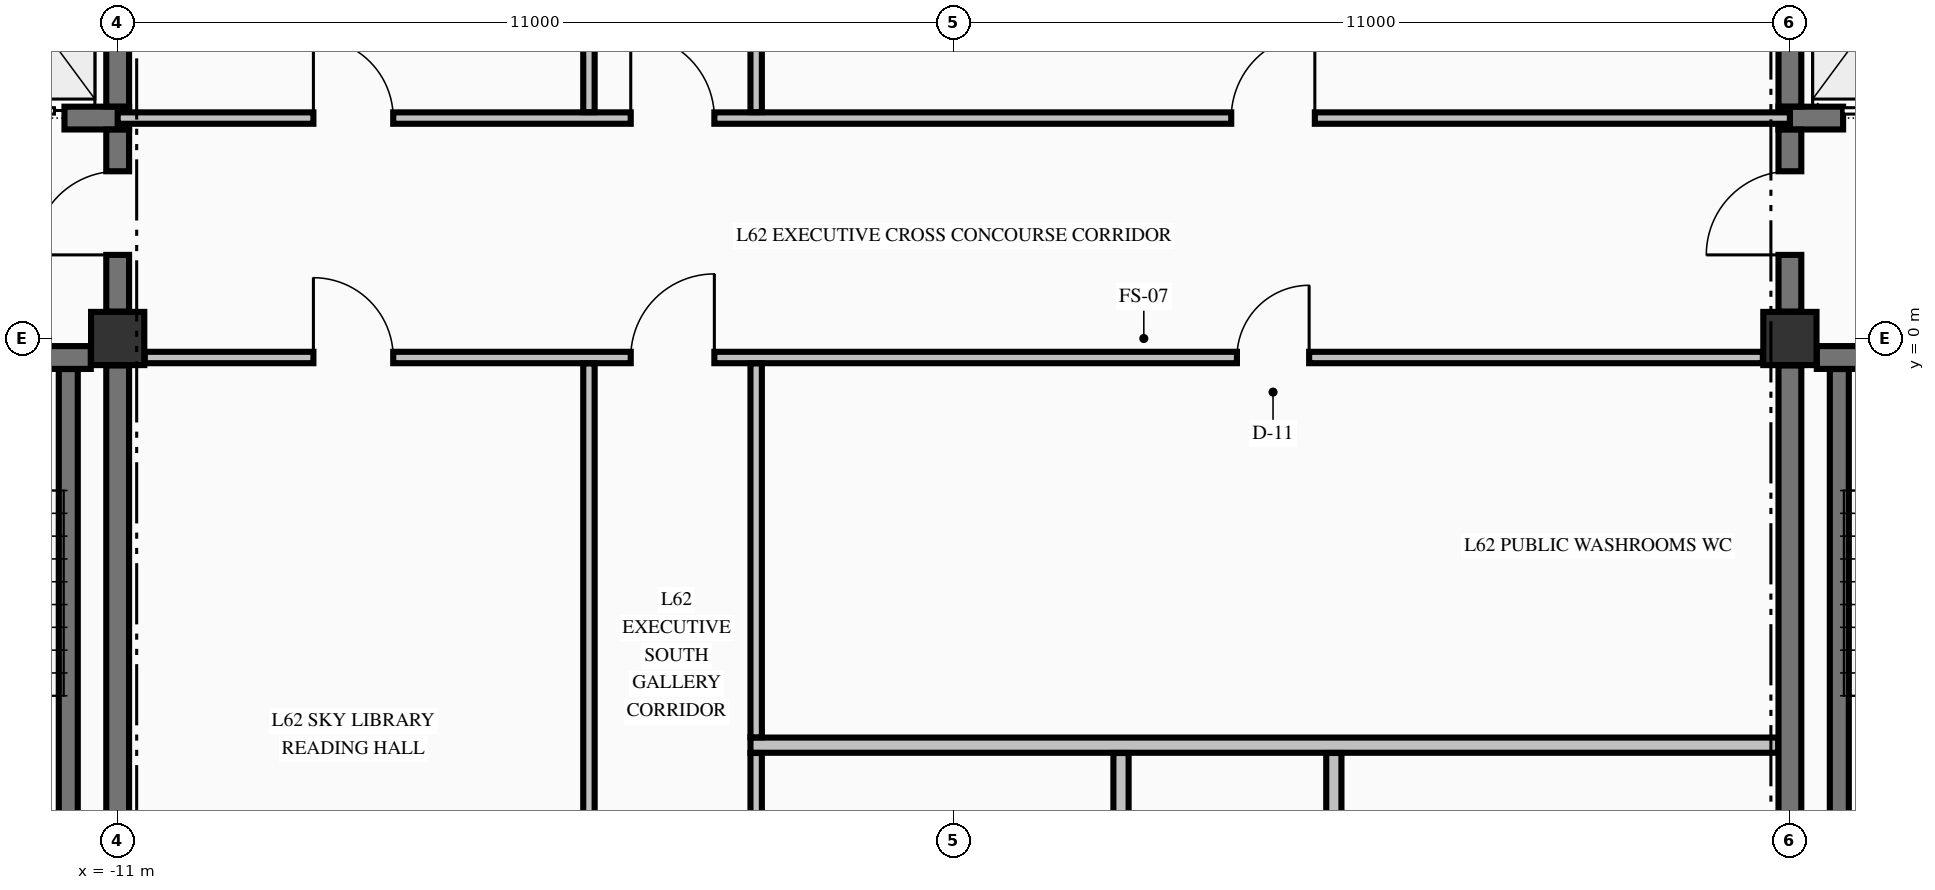
"""IFC4 building model, lengths in metres.
Left out: names, types, materials, properties, quantities, classifications, styles, units other than length and angle.
Written with IfcOpenShell. Run it as: python <this file> out.ifc"""

import sys

from ifc_helpers import new_model, si_unit, direction, frame, frame_2d, origin, origin_2d, place, context, subcontext, project, spatial, rectangle, extrude, element, fill, save


model = new_model("IFC4")
c1 = context("Model", 3, precision=1e-05, world=origin(), true_north=direction((0.0, 1.0)))
c2 = subcontext(c1, "Body", "Model", "MODEL_VIEW")
j1 = project(units=[si_unit("LENGTHUNIT", "METRE"), si_unit("PLANEANGLEUNIT", "RADIAN")], contexts=[c1])
p1 = place(None, origin())
s1 = spatial("IfcSite", under=j1, at=p1, CompositionType="ELEMENT")
p2 = place(p1, origin())
s2 = spatial("IfcBuilding", under=s1, at=p2, CompositionType="ELEMENT")
p3 = place(p2, frame((0.0, 0.0, 236.51)))
s3 = spatial("IfcBuildingStorey", under=s2, at=p3, CompositionType="ELEMENT", Elevation=236.51)
for number, where, z_axis, x_axis in (
    (1, (-11.0, 0.0, -0.25), (0.0, 0.0, 1.0), (1.0, 0.0, 0.0)),
    (2, (11.0, 0.0, -0.25), (0.0, 0.0, 1.0), (1.0, 0.0, 0.0)),
):
    element("IfcColumn", number, at=place(p3, frame(where, z_axis=z_axis, x_axis=x_axis)), inside=s3, PredefinedType="COLUMN", context=c2, shape_type="SweptSolid", body=[
        extrude(rectangle(XDim=0.7, YDim=0.7, at=origin_2d()), origin(), (0.0, 0.0, 1.0), 3.23),
    ])
p4 = place(p3, frame((-20.571, -0.25, 0.0), z_axis=(0.0, 0.0, 1.0), x_axis=(1.0, 0.0, 0.0)))
e3 = element("IfcWall", 3, at=p4, inside=s3, PredefinedType="SHEAR", context=c2, shape_type="SweptSolid", body=[
    extrude(rectangle(XDim=9.217, YDim=0.3, at=frame_2d((4.608, 0.0))), origin(), (0.0, 0.0, 1.0), 2.98),
])
p5 = place(p4, frame((6.871, 0.0, 0.0)))
e4 = element("IfcOpeningElement", 4, at=p5, cuts=e3, PredefinedType="OPENING", context=c2, shape_type="SweptSolid", body=[
    extrude(rectangle(XDim=1.1, YDim=2.15, at=frame_2d((0.55, 1.075))), frame((0.0, 0.16, 0.0), z_axis=(0.0, -1.0, 0.0), x_axis=(1.0, 0.0, 0.0)), (0.0, 0.0, 1.0), 0.32),
])
p6 = place(p3, frame((11.354, -0.25, 0.0), z_axis=(0.0, 0.0, 1.0), x_axis=(1.0, 0.0, 0.0)))
e5 = element("IfcWall", 5, at=p6, inside=s3, PredefinedType="SHEAR", context=c2, shape_type="SweptSolid", body=[
    extrude(rectangle(XDim=3.521, YDim=0.3, at=frame_2d((1.76, 0.0))), origin(), (0.0, 0.0, 1.0), 2.98),
])
p7 = place(p6, frame((1.246, 0.0, 0.0)))
e6 = element("IfcOpeningElement", 6, at=p7, cuts=e5, PredefinedType="OPENING", context=c2, shape_type="SweptSolid", body=[
    extrude(rectangle(XDim=1.1, YDim=2.15, at=frame_2d((0.55, 1.075))), frame((0.0, 0.16, 0.0), z_axis=(0.0, -1.0, 0.0), x_axis=(1.0, 0.0, 0.0)), (0.0, 0.0, 1.0), 0.32),
])
p8 = place(p3, frame((-14.875, 2.9, 0.0), z_axis=(0.0, 0.0, 1.0), x_axis=(1.0, 0.0, 0.0)))
e7 = element("IfcWall", 7, at=p8, inside=s3, PredefinedType="SHEAR", context=c2, shape_type="SweptSolid", body=[
    extrude(rectangle(XDim=4.025, YDim=0.3, at=frame_2d((2.012, 0.0))), origin(), (0.0, 0.0, 1.0), 2.98),
])
p9 = place(p8, frame((2.075, 0.0, 0.0)))
e8 = element("IfcOpeningElement", 8, at=p9, cuts=e7, PredefinedType="OPENING", context=c2, shape_type="SweptSolid", body=[
    extrude(rectangle(XDim=1.1, YDim=2.2, at=frame_2d((0.55, 1.1))), frame((0.0, 0.16, 0.0), z_axis=(0.0, -1.0, 0.0), x_axis=(1.0, 0.0, 0.0)), (0.0, 0.0, 1.0), 0.32),
])
p10 = place(p3, frame((10.85, 2.9, 0.0), z_axis=(0.0, 0.0, 1.0), x_axis=(1.0, 0.0, 0.0)))
e9 = element("IfcWall", 9, at=p10, inside=s3, PredefinedType="SHEAR", context=c2, shape_type="SweptSolid", body=[
    extrude(rectangle(XDim=4.025, YDim=0.3, at=frame_2d((2.012, 0.0))), origin(), (0.0, 0.0, 1.0), 2.98),
])
p11 = place(p10, frame((0.85, 0.0, 0.0)))
e10 = element("IfcOpeningElement", 10, at=p11, cuts=e9, PredefinedType="OPENING", context=c2, shape_type="SweptSolid", body=[
    extrude(rectangle(XDim=1.1, YDim=2.2, at=frame_2d((0.55, 1.1))), frame((0.0, 0.16, 0.0), z_axis=(0.0, -1.0, 0.0), x_axis=(1.0, 0.0, 0.0)), (0.0, 0.0, 1.0), 0.32),
])
p12 = place(p3, frame((-2.675, -5.35, 0.0), z_axis=(0.0, 0.0, 1.0), x_axis=(1.0, 0.0, 0.0)))
e11 = element("IfcWall", 11, at=p12, inside=s3, PredefinedType="PARTITIONING", context=c2, shape_type="SweptSolid", body=[
    extrude(rectangle(XDim=13.522, YDim=0.2, at=frame_2d((6.761, 0.0))), origin(), (0.0, 0.0, 1.0), 2.98),
])
p13 = place(p3, frame((-10.644, -0.25, 0.0), z_axis=(0.0, 0.0, 1.0), x_axis=(1.0, 0.0, 0.0)))
e12 = element("IfcWall", 12, at=p13, inside=s3, PredefinedType="PARTITIONING", context=c2, shape_type="SweptSolid", body=[
    extrude(rectangle(XDim=21.288, YDim=0.15, at=frame_2d((10.644, 0.0))), origin(), (0.0, 0.0, 1.0), 2.98),
])
p14 = place(p13, frame((6.394, 0.0, 0.0)))
e13 = element("IfcOpeningElement", 13, at=p14, cuts=e12, PredefinedType="OPENING", context=c2, shape_type="SweptSolid", body=[
    extrude(rectangle(XDim=1.1, YDim=2.15, at=frame_2d((0.55, 1.075))), frame((0.0, 0.085, 0.0), z_axis=(0.0, -1.0, 0.0), x_axis=(1.0, 0.0, 0.0)), (0.0, 0.0, 1.0), 0.17),
])
p15 = place(p13, frame((2.219, 0.0, 0.0)))
e14 = element("IfcOpeningElement", 14, at=p15, cuts=e12, PredefinedType="OPENING", context=c2, shape_type="SweptSolid", body=[
    extrude(rectangle(XDim=1.05, YDim=2.15, at=frame_2d((0.525, 1.075))), frame((0.0, 0.085, 0.0), z_axis=(0.0, -1.0, 0.0), x_axis=(1.0, 0.0, 0.0)), (0.0, 0.0, 1.0), 0.17),
])
p16 = place(p13, frame((14.369, 0.0, 0.0)))
e15 = element("IfcOpeningElement", 15, at=p16, cuts=e12, PredefinedType="OPENING", context=c2, shape_type="SweptSolid", body=[
    extrude(rectangle(XDim=0.95, YDim=2.15, at=frame_2d((0.475, 1.075))), frame((0.0, 0.085, 0.0), z_axis=(0.0, -1.0, 0.0), x_axis=(1.0, 0.0, 0.0)), (0.0, 0.0, 1.0), 0.17),
])
p17 = place(p3, frame((-11.0, 2.9, 0.0), z_axis=(0.0, 0.0, 1.0), x_axis=(1.0, 0.0, 0.0)))
e16 = element("IfcWall", 16, at=p17, inside=s3, PredefinedType="PARTITIONING", context=c2, shape_type="SweptSolid", body=[
    extrude(rectangle(XDim=22.0, YDim=0.15, at=frame_2d((11.0, 0.0))), origin(), (0.0, 0.0, 1.0), 2.98),
])
p18 = place(p17, frame((6.75, 0.0, 0.0)))
e17 = element("IfcOpeningElement", 17, at=p18, cuts=e16, PredefinedType="OPENING", context=c2, shape_type="SweptSolid", body=[
    extrude(rectangle(XDim=1.1, YDim=2.15, at=frame_2d((0.55, 1.075))), frame((0.0, 0.085, 0.0), z_axis=(0.0, -1.0, 0.0), x_axis=(1.0, 0.0, 0.0)), (0.0, 0.0, 1.0), 0.17),
])
p19 = place(p17, frame((2.575, 0.0, 0.0)))
e18 = element("IfcOpeningElement", 18, at=p19, cuts=e16, PredefinedType="OPENING", context=c2, shape_type="SweptSolid", body=[
    extrude(rectangle(XDim=1.05, YDim=2.15, at=frame_2d((0.525, 1.075))), frame((0.0, 0.085, 0.0), z_axis=(0.0, -1.0, 0.0), x_axis=(1.0, 0.0, 0.0)), (0.0, 0.0, 1.0), 0.17),
])
p20 = place(p17, frame((14.65, 0.0, 0.0)))
e19 = element("IfcOpeningElement", 19, at=p20, cuts=e16, PredefinedType="OPENING", context=c2, shape_type="SweptSolid", body=[
    extrude(rectangle(XDim=1.1, YDim=2.15, at=frame_2d((0.55, 1.075))), frame((0.0, 0.085, 0.0), z_axis=(0.0, -1.0, 0.0), x_axis=(1.0, 0.0, 0.0)), (0.0, 0.0, 1.0), 0.17),
])
p21 = place(p3, frame((-11.65, -9.798, 0.0), z_axis=(0.0, 0.0, 1.0), x_axis=(0.0, 1.0, 0.0)))
e20 = element("IfcWall", 20, at=p21, inside=s3, PredefinedType="SOLIDWALL", context=c2, shape_type="SweptSolid", body=[
    extrude(rectangle(XDim=9.396, YDim=0.25, at=frame_2d((4.698, 0.0))), origin(), (0.0, 0.0, 1.0), 2.98),
])
p22 = place(p3, frame((-11.0, -9.596, 0.0), z_axis=(0.0, 0.0, 1.0), x_axis=(0.0, 1.0, 0.0)))
e21 = element("IfcWall", 21, at=p22, inside=s3, PredefinedType="SHEAR", context=c2, shape_type="SweptSolid", body=[
    extrude(rectangle(XDim=9.242, YDim=0.3, at=frame_2d((4.621, 0.0))), origin(), (0.0, 0.0, 1.0), 2.98),
])
p23 = place(p3, frame((-11.0, 0.354, 0.0), z_axis=(0.0, 0.0, 1.0), x_axis=(0.0, 1.0, 0.0)))
e22 = element("IfcWall", 22, at=p23, inside=s3, PredefinedType="SHEAR", context=c2, shape_type="SweptSolid", body=[
    extrude(rectangle(XDim=2.394, YDim=0.3, at=frame_2d((1.197, 0.0))), origin(), (0.0, 0.0, 1.0), 2.98),
])
p24 = place(p23, frame((0.746, 0.0, 0.0)))
e23 = element("IfcOpeningElement", 23, at=p24, cuts=e22, PredefinedType="OPENING", context=c2, shape_type="SweptSolid", body=[
    extrude(rectangle(XDim=1.1, YDim=2.15, at=frame_2d((0.55, 1.075))), frame((0.0, 0.16, 0.0), z_axis=(0.0, -1.0, 0.0), x_axis=(1.0, 0.0, 0.0)), (0.0, 0.0, 1.0), 0.32),
])
p25 = place(p3, frame((-11.0, 3.052, 0.0), z_axis=(0.0, 0.0, 1.0), x_axis=(0.0, 1.0, 0.0)))
e24 = element("IfcWall", 24, at=p25, inside=s3, PredefinedType="SHEAR", context=c2, shape_type="SweptSolid", body=[
    extrude(rectangle(XDim=2.496, YDim=0.3, at=frame_2d((1.248, 0.0))), origin(), (0.0, 0.0, 1.0), 2.98),
])
p26 = place(p3, frame((11.0, -9.596, 0.0), z_axis=(0.0, 0.0, 1.0), x_axis=(0.0, 1.0, 0.0)))
e25 = element("IfcWall", 25, at=p26, inside=s3, PredefinedType="SHEAR", context=c2, shape_type="SweptSolid", body=[
    extrude(rectangle(XDim=9.242, YDim=0.3, at=frame_2d((4.621, 0.0))), origin(), (0.0, 0.0, 1.0), 2.98),
])
p27 = place(p3, frame((11.0, 0.354, 0.0), z_axis=(0.0, 0.0, 1.0), x_axis=(0.0, 1.0, 0.0)))
e26 = element("IfcWall", 26, at=p27, inside=s3, PredefinedType="SHEAR", context=c2, shape_type="SweptSolid", body=[
    extrude(rectangle(XDim=2.394, YDim=0.3, at=frame_2d((1.197, 0.0))), origin(), (0.0, 0.0, 1.0), 2.98),
])
p28 = place(p27, frame((0.746, 0.0, 0.0)))
e27 = element("IfcOpeningElement", 27, at=p28, cuts=e26, PredefinedType="OPENING", context=c2, shape_type="SweptSolid", body=[
    extrude(rectangle(XDim=1.1, YDim=2.15, at=frame_2d((0.55, 1.075))), frame((0.0, 0.16, 0.0), z_axis=(0.0, -1.0, 0.0), x_axis=(1.0, 0.0, 0.0)), (0.0, 0.0, 1.0), 0.32),
])
p29 = place(p3, frame((11.0, 3.052, 0.0), z_axis=(0.0, 0.0, 1.0), x_axis=(0.0, 1.0, 0.0)))
e28 = element("IfcWall", 28, at=p29, inside=s3, PredefinedType="SHEAR", context=c2, shape_type="SweptSolid", body=[
    extrude(rectangle(XDim=2.496, YDim=0.3, at=frame_2d((1.248, 0.0))), origin(), (0.0, 0.0, 1.0), 2.98),
])
p30 = place(p3, frame((11.65, -9.798, 0.0), z_axis=(0.0, 0.0, 1.0), x_axis=(0.0, 1.0, 0.0)))
e29 = element("IfcWall", 29, at=p30, inside=s3, PredefinedType="SOLIDWALL", context=c2, shape_type="SweptSolid", body=[
    extrude(rectangle(XDim=9.396, YDim=0.25, at=frame_2d((4.698, 0.0))), origin(), (0.0, 0.0, 1.0), 2.98),
])
p31 = place(p3, frame((-4.8, -9.872, 0.0), z_axis=(0.0, 0.0, 1.0), x_axis=(0.0, 1.0, 0.0)))
e30 = element("IfcWall", 30, at=p31, inside=s3, PredefinedType="PARTITIONING", context=c2, shape_type="SweptSolid", body=[
    extrude(rectangle(XDim=9.544, YDim=0.15, at=frame_2d((4.772, 0.0))), origin(), (0.0, 0.0, 1.0), 2.98),
])
p32 = place(p3, frame((-4.8, 2.978, 0.0), z_axis=(0.0, 0.0, 1.0), x_axis=(0.0, 1.0, 0.0)))
e31 = element("IfcWall", 31, at=p32, inside=s3, PredefinedType="PARTITIONING", context=c2, shape_type="SweptSolid", body=[
    extrude(rectangle(XDim=7.444, YDim=0.15, at=frame_2d((3.722, 0.0))), origin(), (0.0, 0.0, 1.0), 2.98),
])
p33 = place(p3, frame((-2.6, -9.872, 0.0), z_axis=(0.0, 0.0, 1.0), x_axis=(0.0, 1.0, 0.0)))
e32 = element("IfcWall", 32, at=p33, inside=s3, PredefinedType="PARTITIONING", context=c2, shape_type="SweptSolid", body=[
    extrude(rectangle(XDim=4.419, YDim=0.15, at=frame_2d((2.209, 0.0))), origin(), (0.0, 0.0, 1.0), 2.98),
])
p34 = place(p33, frame((2.597, 0.0, 0.0)))
e33 = element("IfcOpeningElement", 33, at=p34, cuts=e32, PredefinedType="OPENING", context=c2, shape_type="SweptSolid", body=[
    extrude(rectangle(XDim=0.95, YDim=2.15, at=frame_2d((0.475, 1.075))), frame((0.0, 0.085, 0.0), z_axis=(0.0, -1.0, 0.0), x_axis=(1.0, 0.0, 0.0)), (0.0, 0.0, 1.0), 0.17),
])
p35 = place(p3, frame((-2.6, -5.247, 0.0), z_axis=(0.0, 0.0, 1.0), x_axis=(0.0, 1.0, 0.0)))
e34 = element("IfcWall", 34, at=p35, inside=s3, PredefinedType="PARTITIONING", context=c2, shape_type="SweptSolid", body=[
    extrude(rectangle(XDim=4.919, YDim=0.15, at=frame_2d((2.459, 0.0))), origin(), (0.0, 0.0, 1.0), 2.98),
])
p36 = place(p3, frame((-2.6, 2.978, 0.0), z_axis=(0.0, 0.0, 1.0), x_axis=(0.0, 1.0, 0.0)))
e35 = element("IfcWall", 35, at=p36, inside=s3, PredefinedType="PARTITIONING", context=c2, shape_type="SweptSolid", body=[
    extrude(rectangle(XDim=7.444, YDim=0.15, at=frame_2d((3.722, 0.0))), origin(), (0.0, 0.0, 1.0), 2.98),
])
for number, where, z_axis, x_axis in (
    (36, (2.2, -9.872, 0.0), (0.0, 0.0, 1.0), (0.0, 1.0, 0.0)),
    (37, (5.0, -9.872, 0.0), (0.0, 0.0, 1.0), (0.0, 1.0, 0.0)),
):
    element("IfcWall", number, at=place(p3, frame(where, z_axis=z_axis, x_axis=x_axis)), inside=s3, PredefinedType="PARTITIONING", context=c2, shape_type="SweptSolid", body=[
        extrude(rectangle(XDim=4.419, YDim=0.2, at=frame_2d((2.209, 0.0))), origin(), (0.0, 0.0, 1.0), 2.98),
    ])
p37 = place(p24, origin())
e38 = element("IfcDoor", 38, at=p37, inside=s3, OperationType="SINGLE_SWING_LEFT", PredefinedType="DOOR", context=c2, shape_type="SweptSolid", body=[
    extrude(rectangle(XDim=1.1, YDim=2.15, at=frame_2d((0.55, 1.075))), frame((0.0, 0.025, 0.0), z_axis=(0.0, -1.0, 0.0), x_axis=(1.0, 0.0, 0.0)), (0.0, 0.0, 1.0), 0.05),
])
fill(e23, e38)
p38 = place(p9, origin())
e39 = element("IfcDoor", 39, at=p38, inside=s3, OperationType="SLIDING_TO_LEFT", PredefinedType="DOOR", context=c2, shape_type="SweptSolid", body=[
    extrude(rectangle(XDim=1.1, YDim=2.2, at=frame_2d((0.55, 1.1))), frame((0.0, 0.025, 0.0), z_axis=(0.0, -1.0, 0.0), x_axis=(1.0, 0.0, 0.0)), (0.0, 0.0, 1.0), 0.05),
])
fill(e8, e39)
p39 = place(p28, origin())
e40 = element("IfcDoor", 40, at=p39, inside=s3, OperationType="SINGLE_SWING_LEFT", PredefinedType="DOOR", context=c2, shape_type="SweptSolid", body=[
    extrude(rectangle(XDim=1.1, YDim=2.15, at=frame_2d((0.55, 1.075))), frame((0.0, 0.025, 0.0), z_axis=(0.0, -1.0, 0.0), x_axis=(1.0, 0.0, 0.0)), (0.0, 0.0, 1.0), 0.05),
])
fill(e27, e40)
p40 = place(p11, origin())
e41 = element("IfcDoor", 41, at=p40, inside=s3, OperationType="SLIDING_TO_RIGHT", PredefinedType="DOOR", context=c2, shape_type="SweptSolid", body=[
    extrude(rectangle(XDim=1.1, YDim=2.2, at=frame_2d((0.55, 1.1))), frame((0.0, 0.025, 0.0), z_axis=(0.0, -1.0, 0.0), x_axis=(1.0, 0.0, 0.0)), (0.0, 0.0, 1.0), 0.05),
])
fill(e10, e41)
p41 = place(p18, origin())
e42 = element("IfcDoor", 42, at=p41, inside=s3, OperationType="SINGLE_SWING_LEFT", PredefinedType="DOOR", context=c2, shape_type="SweptSolid", body=[
    extrude(rectangle(XDim=1.1, YDim=2.15, at=frame_2d((0.55, 1.075))), frame((0.0, 0.025, 0.0), z_axis=(0.0, -1.0, 0.0), x_axis=(1.0, 0.0, 0.0)), (0.0, 0.0, 1.0), 0.05),
])
fill(e17, e42)
p42 = place(p14, origin())
e43 = element("IfcDoor", 43, at=p42, inside=s3, OperationType="SINGLE_SWING_RIGHT", PredefinedType="DOOR", context=c2, shape_type="SweptSolid", body=[
    extrude(rectangle(XDim=1.1, YDim=2.15, at=frame_2d((0.55, 1.075))), frame((0.0, 0.025, 0.0), z_axis=(0.0, -1.0, 0.0), x_axis=(1.0, 0.0, 0.0)), (0.0, 0.0, 1.0), 0.05),
])
fill(e13, e43)
p43 = place(p19, origin())
e44 = element("IfcDoor", 44, at=p43, inside=s3, OperationType="SINGLE_SWING_LEFT", PredefinedType="DOOR", context=c2, shape_type="SweptSolid", body=[
    extrude(rectangle(XDim=1.05, YDim=2.15, at=frame_2d((0.525, 1.075))), frame((0.0, 0.025, 0.0), z_axis=(0.0, -1.0, 0.0), x_axis=(1.0, 0.0, 0.0)), (0.0, 0.0, 1.0), 0.05),
])
fill(e18, e44)
p44 = place(p20, origin())
e45 = element("IfcDoor", 45, at=p44, inside=s3, OperationType="SINGLE_SWING_RIGHT", PredefinedType="DOOR", context=c2, shape_type="SweptSolid", body=[
    extrude(rectangle(XDim=1.1, YDim=2.15, at=frame_2d((0.55, 1.075))), frame((0.0, 0.025, 0.0), z_axis=(0.0, -1.0, 0.0), x_axis=(1.0, 0.0, 0.0)), (0.0, 0.0, 1.0), 0.05),
])
fill(e19, e45)
p45 = place(p15, origin())
e46 = element("IfcDoor", 46, at=p45, inside=s3, OperationType="SINGLE_SWING_LEFT", PredefinedType="DOOR", context=c2, shape_type="SweptSolid", body=[
    extrude(rectangle(XDim=1.05, YDim=2.15, at=frame_2d((0.525, 1.075))), frame((0.0, 0.025, 0.0), z_axis=(0.0, -1.0, 0.0), x_axis=(1.0, 0.0, 0.0)), (0.0, 0.0, 1.0), 0.05),
])
fill(e14, e46)
p46 = place(p16, origin())
e47 = element("IfcDoor", 47, at=p46, inside=s3, OperationType="SINGLE_SWING_RIGHT", PredefinedType="DOOR", context=c2, shape_type="SweptSolid", body=[
    extrude(rectangle(XDim=0.95, YDim=2.15, at=frame_2d((0.475, 1.075))), frame((0.0, 0.025, 0.0), z_axis=(0.0, -1.0, 0.0), x_axis=(1.0, 0.0, 0.0)), (0.0, 0.0, 1.0), 0.05),
])
fill(e15, e47)
save(model, sys.argv[1])
